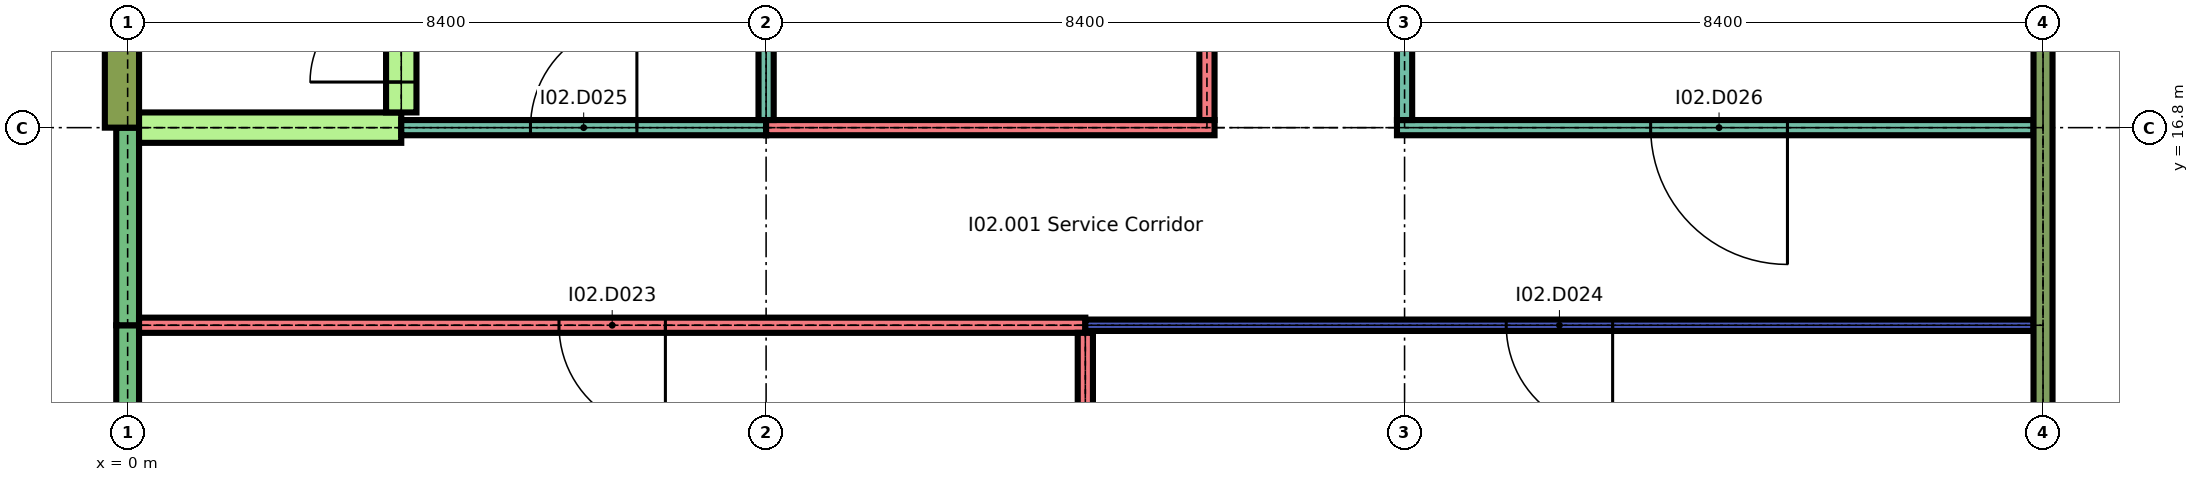
"""IFC4 building model, lengths in metres.
Left out: names, types, materials, properties, quantities, classifications, styles, units other than length and angle.
Written with IfcOpenShell. Run it as: python <this file> out.ifc"""

import sys

from ifc_helpers import new_model, si_unit, direction, frame, frame_2d, origin, place, context, subcontext, project, spatial, rectangle, extrude, element, fill, save


model = new_model("IFC4")
c1 = context("Model", 3, precision=1e-05, world=origin(), true_north=direction((0.0, 1.0)))
c2 = subcontext(c1, "Body", "Model", "MODEL_VIEW")
j1 = project(units=[si_unit("LENGTHUNIT", "METRE"), si_unit("PLANEANGLEUNIT", "RADIAN")], contexts=[c1])
p1 = place(None, origin())
s1 = spatial("IfcSite", under=j1, at=p1, CompositionType="ELEMENT")
p2 = place(p1, origin())
s2 = spatial("IfcBuilding", under=s1, at=p2, CompositionType="ELEMENT")
p3 = place(p2, frame((0.0, 0.0, 12.9)))
s3 = spatial("IfcBuildingStorey", under=s2, at=p3, CompositionType="ELEMENT", Elevation=12.9)
p4 = place(p3, frame((0.0, 8.825, 0.0), z_axis=(0.0, 0.0, 1.0), x_axis=(0.0, 1.0, 0.0)))
e1 = element("IfcWall", 1, at=p4, inside=s3, PredefinedType="SOLIDWALL", context=c2, shape_type="SweptSolid", body=[
    extrude(rectangle(XDim=5.375, YDim=0.3, at=frame_2d((2.688, 0.0))), origin(), (0.0, 0.0, 1.0), 1.74),
])
p5 = place(p4, frame((0.625, 0.0, 0.6)))
e2 = element("IfcOpeningElement", 2, at=p5, cuts=e1, PredefinedType="OPENING", context=c2, shape_type="SweptSolid", body=[
    extrude(rectangle(XDim=2.1, YDim=1.05, at=frame_2d((1.05, 0.525))), frame((0.0, 0.16, 0.0), z_axis=(0.0, -1.0, 0.0), x_axis=(1.0, 0.0, 0.0)), (0.0, 0.0, 1.0), 0.32),
])
p6 = place(p3, frame((0.0, 14.2, 0.0), z_axis=(0.0, 0.0, 1.0), x_axis=(0.0, 1.0, 0.0)))
e3 = element("IfcWall", 3, at=p6, inside=s3, PredefinedType="SOLIDWALL", context=c2, shape_type="SweptSolid", body=[
    extrude(rectangle(XDim=2.6, YDim=0.3, at=frame_2d((1.3, 0.0))), origin(), (0.0, 0.0, 1.0), 1.74),
])
p7 = place(p3, frame((-0.075, 16.8, 0.0), z_axis=(0.0, 0.0, 1.0), x_axis=(0.0, 1.0, 0.0)))
e4 = element("IfcWall", 4, at=p7, inside=s3, PredefinedType="SOLIDWALL", context=c2, shape_type="SweptSolid", body=[
    extrude(rectangle(XDim=3.15, YDim=0.45, at=frame_2d((1.575, 0.0))), origin(), (0.0, 0.0, 1.0), 2.04),
])
p8 = place(p3, frame((0.15, 14.2, 0.0), z_axis=(0.0, 0.0, 1.0), x_axis=(1.0, 0.0, 0.0)))
e5 = element("IfcWall", 5, at=p8, inside=s3, PredefinedType="SOLIDWALL", context=c2, shape_type="SweptSolid", body=[
    extrude(rectangle(XDim=12.45, YDim=0.2, at=frame_2d((6.225, 0.0))), origin(), (0.0, 0.0, 1.0), 2.04),
])
p9 = place(p8, frame((5.525, 0.0, 0.0)))
e6 = element("IfcOpeningElement", 6, at=p9, cuts=e5, PredefinedType="OPENING", context=c2, shape_type="SweptSolid", body=[
    extrude(rectangle(XDim=1.4, YDim=2.0, at=frame_2d((0.7, 1.0))), frame((0.0, 0.11, 0.0), z_axis=(0.0, -1.0, 0.0), x_axis=(1.0, 0.0, 0.0)), (0.0, 0.0, 1.0), 0.22),
])
p10 = place(p3, frame((12.6, 14.2, 0.0), z_axis=(0.0, 0.0, 1.0), x_axis=(1.0, 0.0, 0.0)))
e7 = element("IfcWall", 7, at=p10, inside=s3, PredefinedType="PARTITIONING", context=c2, shape_type="SweptSolid", body=[
    extrude(rectangle(XDim=12.475, YDim=0.15, at=frame_2d((6.237, 0.0))), origin(), (0.0, 0.0, 1.0), 2.04),
])
p11 = place(p10, frame((5.538, 0.0, 0.0)))
e8 = element("IfcOpeningElement", 8, at=p11, cuts=e7, PredefinedType="OPENING", context=c2, shape_type="SweptSolid", body=[
    extrude(rectangle(XDim=1.4, YDim=2.0, at=frame_2d((0.7, 1.0))), frame((0.0, 0.085, 0.0), z_axis=(0.0, -1.0, 0.0), x_axis=(1.0, 0.0, 0.0)), (0.0, 0.0, 1.0), 0.17),
])
p12 = place(p3, frame((0.15, 16.8, 0.0), z_axis=(0.0, 0.0, 1.0), x_axis=(1.0, 0.0, 0.0)))
e9 = element("IfcWall", 9, at=p12, inside=s3, PredefinedType="SHEAR", context=c2, shape_type="SweptSolid", body=[
    extrude(rectangle(XDim=3.45, YDim=0.4, at=frame_2d((1.725, 0.0))), origin(), (0.0, 0.0, 1.0), 2.04),
])
p13 = place(p3, frame((3.6, 16.8, 0.0), z_axis=(0.0, 0.0, 1.0), x_axis=(1.0, 0.0, 0.0)))
e10 = element("IfcWall", 10, at=p13, inside=s3, PredefinedType="PARTITIONING", context=c2, shape_type="SweptSolid", body=[
    extrude(rectangle(XDim=4.8, YDim=0.2, at=frame_2d((2.4, 0.0))), origin(), (0.0, 0.0, 1.0), 2.04),
])
p14 = place(p13, frame((1.7, 0.0, 0.0)))
e11 = element("IfcOpeningElement", 11, at=p14, cuts=e10, PredefinedType="OPENING", context=c2, shape_type="SweptSolid", body=[
    extrude(rectangle(XDim=1.4, YDim=2.0, at=frame_2d((0.7, 1.0))), frame((0.0, 0.11, 0.0), z_axis=(0.0, -1.0, 0.0), x_axis=(1.0, 0.0, 0.0)), (0.0, 0.0, 1.0), 0.22),
])
p15 = place(p3, frame((8.4, 16.8, 0.0), z_axis=(0.0, 0.0, 1.0), x_axis=(1.0, 0.0, 0.0)))
e12 = element("IfcWall", 12, at=p15, inside=s3, PredefinedType="SOLIDWALL", context=c2, shape_type="SweptSolid", body=[
    extrude(rectangle(XDim=5.9, YDim=0.2, at=frame_2d((2.95, 0.0))), origin(), (0.0, 0.0, 1.0), 2.04),
])
p16 = place(p3, frame((16.7, 16.8, 0.0), z_axis=(0.0, 0.0, 1.0), x_axis=(1.0, 0.0, 0.0)))
e13 = element("IfcWall", 13, at=p16, inside=s3, PredefinedType="PARTITIONING", context=c2, shape_type="SweptSolid", body=[
    extrude(rectangle(XDim=8.375, YDim=0.2, at=frame_2d((4.188, 0.0))), origin(), (0.0, 0.0, 1.0), 2.04),
])
p17 = place(p16, frame((3.337, 0.0, 0.0)))
e14 = element("IfcOpeningElement", 14, at=p17, cuts=e13, PredefinedType="OPENING", context=c2, shape_type="SweptSolid", body=[
    extrude(rectangle(XDim=1.8, YDim=2.0, at=frame_2d((0.9, 1.0))), frame((0.0, 0.11, 0.0), z_axis=(0.0, -1.0, 0.0), x_axis=(1.0, 0.0, 0.0)), (0.0, 0.0, 1.0), 0.22),
])
p18 = place(p3, frame((3.6, 17.0, 0.0), z_axis=(0.0, 0.0, 1.0), x_axis=(0.0, 1.0, 0.0)))
e15 = element("IfcWall", 15, at=p18, inside=s3, PredefinedType="SHEAR", context=c2, shape_type="SweptSolid", body=[
    extrude(rectangle(XDim=8.0, YDim=0.4, at=frame_2d((4.0, 0.0))), origin(), (0.0, 0.0, 1.0), 2.04),
])
p19 = place(p18, frame((0.4, 0.0, 0.0)))
e16 = element("IfcOpeningElement", 16, at=p19, cuts=e15, PredefinedType="OPENING", context=c2, shape_type="SweptSolid", body=[
    extrude(rectangle(XDim=1.2, YDim=2.0, at=frame_2d((0.6, 1.0))), frame((0.0, 0.21, 0.0), z_axis=(0.0, -1.0, 0.0), x_axis=(1.0, 0.0, 0.0)), (0.0, 0.0, 1.0), 0.42),
])
p20 = place(p3, frame((8.4, 16.9, 0.0), z_axis=(0.0, 0.0, 1.0), x_axis=(0.0, 1.0, 0.0)))
e17 = element("IfcWall", 17, at=p20, inside=s3, PredefinedType="PARTITIONING", context=c2, shape_type="SweptSolid", body=[
    extrude(rectangle(XDim=8.2, YDim=0.2, at=frame_2d((4.1, 0.0))), origin(), (0.0, 0.0, 1.0), 2.04),
])
p21 = place(p3, frame((12.6, 0.15, 0.0), z_axis=(0.0, 0.0, 1.0), x_axis=(0.0, 1.0, 0.0)))
e18 = element("IfcWall", 18, at=p21, inside=s3, PredefinedType="SOLIDWALL", context=c2, shape_type="SweptSolid", body=[
    extrude(rectangle(XDim=13.95, YDim=0.2, at=frame_2d((6.975, 0.0))), origin(), (0.0, 0.0, 1.0), 2.04),
])
p22 = place(p3, frame((14.2, 16.9, 0.0), z_axis=(0.0, 0.0, 1.0), x_axis=(0.0, 1.0, 0.0)))
e19 = element("IfcWall", 19, at=p22, inside=s3, PredefinedType="SOLIDWALL", context=c2, shape_type="SweptSolid", body=[
    extrude(rectangle(XDim=8.2, YDim=0.2, at=frame_2d((4.1, 0.0))), origin(), (0.0, 0.0, 1.0), 2.04),
])
p23 = place(p22, frame((3.6, 0.0, 0.0)))
e20 = element("IfcOpeningElement", 20, at=p23, cuts=e19, PredefinedType="OPENING", context=c2, shape_type="SweptSolid", body=[
    extrude(rectangle(XDim=1.0, YDim=2.0, at=frame_2d((0.5, 1.0))), frame((0.0, 0.11, 0.0), z_axis=(0.0, -1.0, 0.0), x_axis=(1.0, 0.0, 0.0)), (0.0, 0.0, 1.0), 0.22),
])
p24 = place(p3, frame((16.8, 16.9, 0.0), z_axis=(0.0, 0.0, 1.0), x_axis=(0.0, 1.0, 0.0)))
e21 = element("IfcWall", 21, at=p24, inside=s3, PredefinedType="PARTITIONING", context=c2, shape_type="SweptSolid", body=[
    extrude(rectangle(XDim=4.7, YDim=0.2, at=frame_2d((2.35, 0.0))), origin(), (0.0, 0.0, 1.0), 2.04),
])
p25 = place(p24, frame((1.45, 0.0, 0.0)))
e22 = element("IfcOpeningElement", 22, at=p25, cuts=e21, PredefinedType="OPENING", context=c2, shape_type="SweptSolid", body=[
    extrude(rectangle(XDim=1.8, YDim=2.0, at=frame_2d((0.9, 1.0))), frame((0.0, 0.11, 0.0), z_axis=(0.0, -1.0, 0.0), x_axis=(1.0, 0.0, 0.0)), (0.0, 0.0, 1.0), 0.22),
])
p26 = place(p3, frame((25.2, 8.825, 0.0), z_axis=(0.0, 0.0, 1.0), x_axis=(0.0, 1.0, 0.0)))
e23 = element("IfcWall", 23, at=p26, inside=s3, PredefinedType="SOLIDWALL", context=c2, shape_type="SweptSolid", body=[
    extrude(rectangle(XDim=12.775, YDim=0.25, at=frame_2d((6.388, 0.0))), origin(), (0.0, 0.0, 1.0), 2.04),
])
p27 = place(p26, frame((9.475, 0.0, 0.0)))
e24 = element("IfcOpeningElement", 24, at=p27, cuts=e23, PredefinedType="OPENING", context=c2, shape_type="SweptSolid", body=[
    extrude(rectangle(XDim=1.8, YDim=2.0, at=frame_2d((0.9, 1.0))), frame((0.0, 0.135, 0.0), z_axis=(0.0, -1.0, 0.0), x_axis=(1.0, 0.0, 0.0)), (0.0, 0.0, 1.0), 0.27),
])
p28 = place(p9, origin())
e25 = element("IfcDoor", 25, at=p28, inside=s3, OperationType="SINGLE_SWING_RIGHT", PredefinedType="DOOR", context=c2, shape_type="SweptSolid", body=[
    extrude(rectangle(XDim=1.4, YDim=2.0, at=frame_2d((0.7, 1.0))), frame((0.0, 0.025, 0.0), z_axis=(0.0, -1.0, 0.0), x_axis=(1.0, 0.0, 0.0)), (0.0, 0.0, 1.0), 0.05),
])
fill(e6, e25)
p29 = place(p11, origin())
e26 = element("IfcDoor", 26, at=p29, inside=s3, OperationType="SINGLE_SWING_RIGHT", PredefinedType="DOOR", context=c2, shape_type="SweptSolid", body=[
    extrude(rectangle(XDim=1.4, YDim=2.0, at=frame_2d((0.7, 1.0))), frame((0.0, 0.025, 0.0), z_axis=(0.0, -1.0, 0.0), x_axis=(1.0, 0.0, 0.0)), (0.0, 0.0, 1.0), 0.05),
])
fill(e8, e26)
p30 = place(p14, origin())
e27 = element("IfcDoor", 27, at=p30, inside=s3, OperationType="SINGLE_SWING_LEFT", PredefinedType="DOOR", context=c2, shape_type="SweptSolid", body=[
    extrude(rectangle(XDim=1.4, YDim=2.0, at=frame_2d((0.7, 1.0))), frame((0.0, 0.03, 0.0), z_axis=(0.0, -1.0, 0.0), x_axis=(1.0, 0.0, 0.0)), (0.0, 0.0, 1.0), 0.06),
])
fill(e11, e27)
p31 = place(p17, origin())
e28 = element("IfcDoor", 28, at=p31, inside=s3, OperationType="SINGLE_SWING_RIGHT", PredefinedType="DOOR", context=c2, shape_type="SweptSolid", body=[
    extrude(rectangle(XDim=1.8, YDim=2.0, at=frame_2d((0.9, 1.0))), frame((0.0, 0.03, 0.0), z_axis=(0.0, -1.0, 0.0), x_axis=(1.0, 0.0, 0.0)), (0.0, 0.0, 1.0), 0.06),
])
fill(e14, e28)
p32 = place(p19, origin())
e29 = element("IfcDoor", 29, at=p32, inside=s3, OperationType="SINGLE_SWING_RIGHT", PredefinedType="DOOR", context=c2, shape_type="SweptSolid", body=[
    extrude(rectangle(XDim=1.2, YDim=2.0, at=frame_2d((0.6, 1.0))), frame((0.0, 0.025, 0.0), z_axis=(0.0, -1.0, 0.0), x_axis=(1.0, 0.0, 0.0)), (0.0, 0.0, 1.0), 0.05),
])
fill(e16, e29)
save(model, sys.argv[1])
